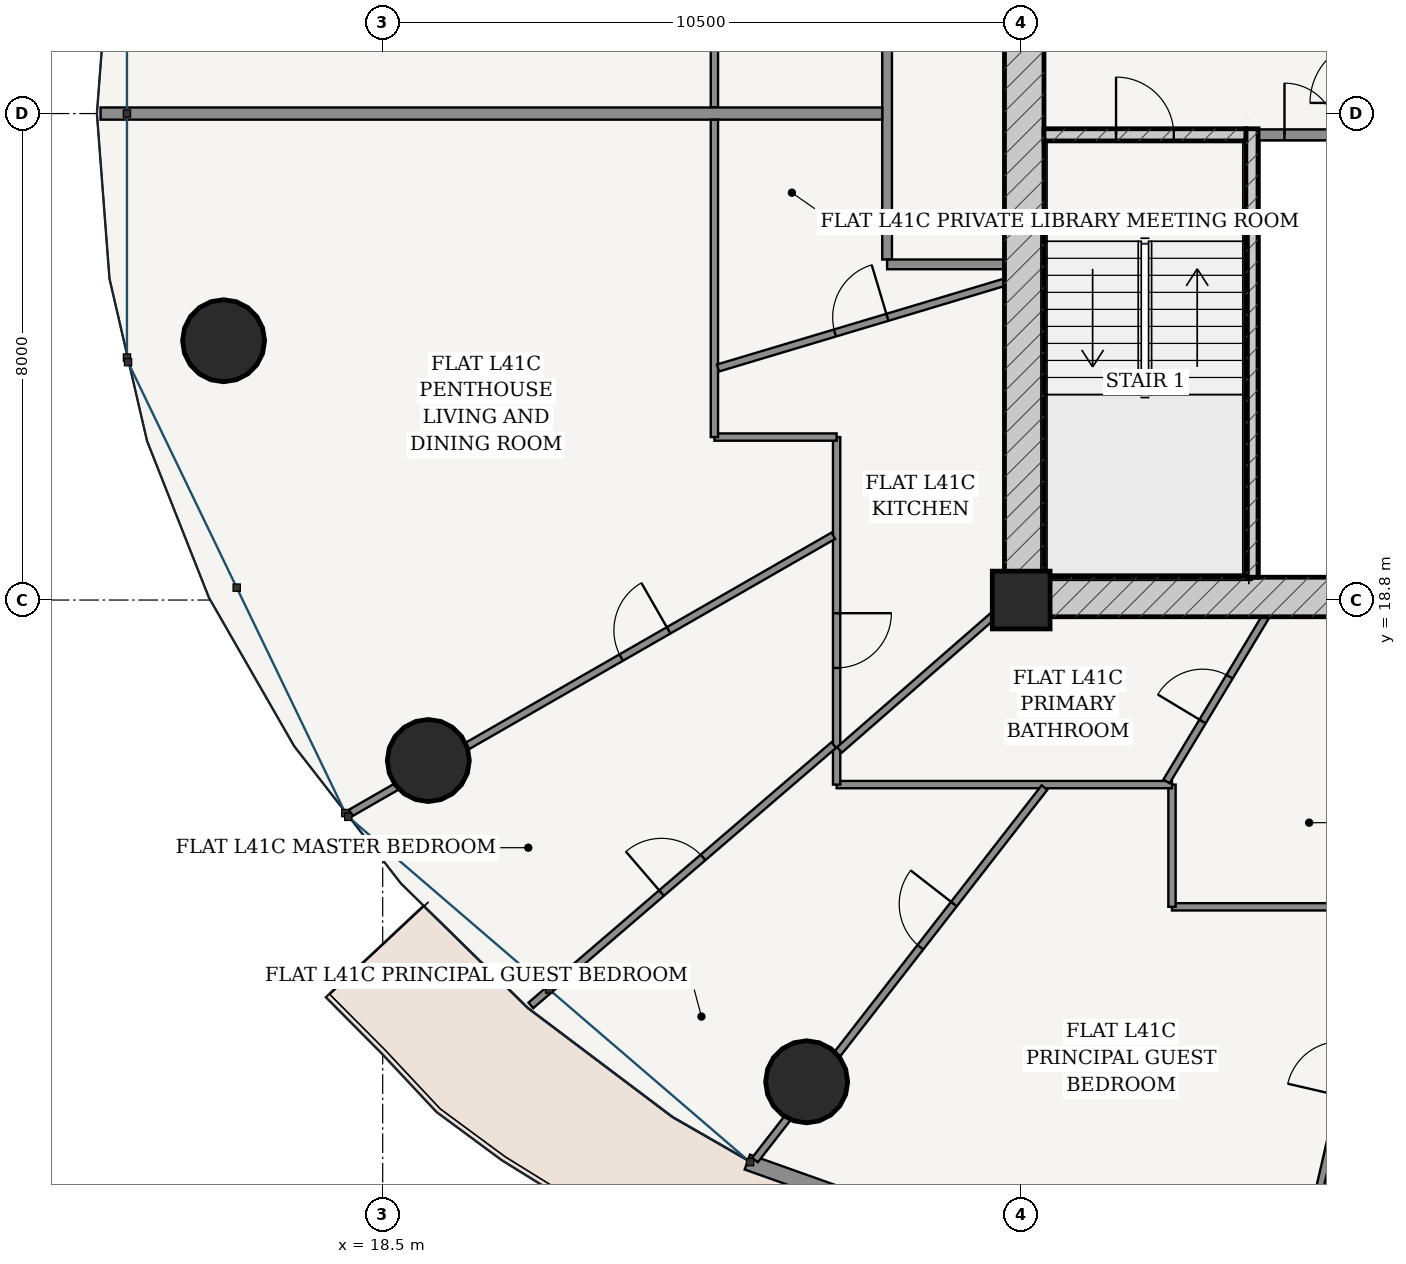
"""IFC4 building model, lengths in metres.
Left out: names, types, materials, properties, quantities, classifications, styles, units other than length and angle.
Written with IfcOpenShell. Run it as: python <this file> out.ifc"""

import sys

from ifc_helpers import new_model, si_unit, direction, frame, frame_2d, origin, origin_2d, place, context, subcontext, project, spatial, rectangle, hollow_circle, extrude, source, transform, mapped, element, fill, save


model = new_model("IFC4")
c1 = context("Model", 3, precision=1e-05, world=origin(), true_north=direction((-0.2419218956, 0.970295726276)))
c2 = subcontext(c1, "Body", "Model", "MODEL_VIEW")
j1 = project(units=[si_unit("LENGTHUNIT", "METRE"), si_unit("PLANEANGLEUNIT", "RADIAN")], contexts=[c1])
p1 = place(None, origin())
s1 = spatial("IfcSite", under=j1, at=p1, CompositionType="ELEMENT")
p2 = place(p1, origin())
s2 = spatial("IfcBuilding", under=s1, at=p2, CompositionType="ELEMENT")
p3 = place(p2, frame((0.0, 0.0, 157.0)))
s3 = spatial("IfcBuildingStorey", under=s2, at=p3, CompositionType="ELEMENT", Elevation=157.0)
p4 = place(p3, frame((29.0, 18.8, 0.0), z_axis=(0.0, 0.0, 1.0), x_axis=(1.0, 0.0, 0.0)))
e1 = element("IfcColumn", 1, at=p4, inside=s3, PredefinedType="COLUMN", context=c2, shape_type="SweptSolid", body=[
    extrude(rectangle(XDim=0.95, YDim=0.95, at=origin_2d()), origin(), (0.0, 0.0, 1.0), 3.6),
])
p5 = place(p3, frame((28.725, 18.85, 0.0), z_axis=(0.0, 0.0, 1.0), x_axis=(1.0, 0.0, 0.0)))
e2 = element("IfcWall", 2, at=p5, inside=s3, PredefinedType="SHEAR", context=c2, shape_type="SweptSolid", body=[
    extrude(rectangle(XDim=18.55, YDim=0.65, at=frame_2d((9.275, 0.0))), origin(), (0.0, 0.0, 1.0), 3.33),
])
p6 = place(p5, frame((8.85, 0.0, 0.0)))
e3 = element("IfcOpeningElement", 3, at=p6, cuts=e2, PredefinedType="OPENING", context=c2, shape_type="SweptSolid", body=[
    extrude(rectangle(XDim=0.85, YDim=2.1, at=frame_2d((0.425, 1.05))), frame((0.0, 0.335, 0.0), z_axis=(0.0, -1.0, 0.0), x_axis=(1.0, 0.0, 0.0)), (0.0, 0.0, 1.0), 0.67),
])
p7 = place(p3, frame((29.05, 19.175, 0.0), z_axis=(0.0, 0.0, 1.0), x_axis=(0.0, 1.0, 0.0)))
e4 = element("IfcWall", 4, at=p7, inside=s3, PredefinedType="SHEAR", context=c2, shape_type="SweptSolid", body=[
    extrude(rectangle(XDim=15.25, YDim=0.65, at=frame_2d((7.625, 0.0))), origin(), (0.0, 0.0, 1.0), 3.33),
])
p8 = place(p7, frame((9.875, 0.0, 0.0)))
e5 = element("IfcOpeningElement", 5, at=p8, cuts=e4, PredefinedType="OPENING", context=c2, shape_type="SweptSolid", body=[
    extrude(rectangle(XDim=1.5, YDim=2.2, at=frame_2d((0.75, 1.1))), frame((0.0, 0.335, 0.0), z_axis=(0.0, -1.0, 0.0), x_axis=(1.0, 0.0, 0.0)), (0.0, 0.0, 1.0), 0.67),
])
p9 = place(p3, frame((32.795, 19.175, 0.0), z_axis=(0.0, 0.0, 1.0), x_axis=(0.0, 1.0, 0.0)))
e6 = element("IfcWall", 6, at=p9, inside=s3, PredefinedType="SOLIDWALL", context=c2, shape_type="SweptSolid", body=[
    extrude(rectangle(XDim=7.375, YDim=0.2, at=frame_2d((3.688, 0.0))), origin(), (0.0, 0.0, 1.0), 3.33),
])
p10 = place(p3, frame((29.375, 26.45, 0.0), z_axis=(0.0, 0.0, 1.0), x_axis=(1.0, 0.0, 0.0)))
e7 = element("IfcWall", 7, at=p10, inside=s3, PredefinedType="SOLIDWALL", context=c2, shape_type="SweptSolid", body=[
    extrude(rectangle(XDim=3.32, YDim=0.2, at=frame_2d((1.66, 0.0))), origin(), (0.0, 0.0, 1.0), 3.33),
])
p11 = place(p10, frame((1.185, 0.0, 0.0)))
e8 = element("IfcOpeningElement", 8, at=p11, cuts=e7, PredefinedType="OPENING", context=c2, shape_type="SweptSolid", body=[
    extrude(rectangle(XDim=0.95, YDim=2.15, at=frame_2d((0.475, 1.075))), frame((0.0, 0.11, 0.0), z_axis=(0.0, -1.0, 0.0), x_axis=(1.0, 0.0, 0.0)), (0.0, 0.0, 1.0), 0.22),
])
for number, where, z_axis, x_axis in (
    (9, (15.883, 23.064, 0.0), (0.0, 0.0, 1.0), (1.0, 0.0, 0.0)),
    (10, (19.25, 16.161, 0.0), (0.0, 0.0, 1.0), (1.0, 0.0, 0.0)),
    (11, (25.472, 10.877, 0.0), (0.0, 0.0, 1.0), (1.0, 0.0, 0.0)),
):
    element("IfcColumn", number, at=place(p3, frame(where, z_axis=z_axis, x_axis=x_axis)), inside=s3, PredefinedType="COLUMN", context=c2, shape_type="SweptSolid", body=[
        extrude(hollow_circle(Radius=0.675, WallThickness=0.042, at=origin_2d()), origin(), (0.0, 0.0, 1.0), 3.6),
    ])
p12 = place(p3, frame((24.497, 9.557, 0.0), z_axis=(0.0, 0.0, 1.0), x_axis=(0.942103604331, -0.335321932934, 0.0)))
e12 = element("IfcWall", 12, at=p12, inside=s3, PredefinedType="SOLIDWALL", context=c2, shape_type="SweptSolid", body=[
    extrude(rectangle(XDim=9.408, YDim=0.26, at=frame_2d((4.704, 0.0))), origin(), (0.0, 0.0, 1.0), 3.33),
])
p13 = place(p12, frame((4.029, 0.0, 0.0)))
e13 = element("IfcOpeningElement", 13, at=p13, cuts=e12, PredefinedType="OPENING", context=c2, shape_type="SweptSolid", body=[
    extrude(rectangle(XDim=1.35, YDim=2.2, at=frame_2d((0.675, 1.1))), frame((0.0, 0.14, 0.0), z_axis=(0.0, -1.0, 0.0), x_axis=(1.0, 0.0, 0.0)), (0.0, 0.0, 1.0), 0.28),
])
p14 = place(p3, frame((32.9, 26.45, 0.0), z_axis=(0.0, 0.0, 1.0), x_axis=(1.0, 0.0, 0.0)))
e14 = element("IfcWall", 14, at=p14, inside=s3, PredefinedType="PARTITIONING", context=c2, shape_type="SweptSolid", body=[
    extrude(rectangle(XDim=1.71, YDim=0.18, at=frame_2d((0.855, 0.0))), origin(), (0.0, 0.0, 1.0), 3.33),
])
p15 = place(p14, frame((0.43, 0.0, 0.0)))
e15 = element("IfcOpeningElement", 15, at=p15, cuts=e14, PredefinedType="OPENING", context=c2, shape_type="SweptSolid", body=[
    extrude(rectangle(XDim=0.85, YDim=2.1, at=frame_2d((0.425, 1.05))), frame((0.0, 0.1, 0.0), z_axis=(0.0, -1.0, 0.0), x_axis=(1.0, 0.0, 0.0)), (0.0, 0.0, 1.0), 0.2),
])
p16 = place(p3, frame((26.795, 24.4, 0.0), z_axis=(0.0, 0.0, 1.0), x_axis=(0.0, 1.0, 0.0)))
e16 = element("IfcWall", 16, at=p16, inside=s3, PredefinedType="PARTITIONING", context=c2, shape_type="SweptSolid", body=[
    extrude(rectangle(XDim=10.675, YDim=0.16, at=frame_2d((5.337, 0.0))), origin(), (0.0, 0.0, 1.0), 2.776),
])
p17 = place(p16, frame((8.422, 0.0, 0.0)))
e17 = element("IfcOpeningElement", 17, at=p17, cuts=e16, PredefinedType="OPENING", context=c2, shape_type="SweptSolid", body=[
    extrude(rectangle(XDim=0.98, YDim=2.2, at=frame_2d((0.49, 1.1))), frame((0.0, 0.09, 0.0), z_axis=(0.0, -1.0, 0.0), x_axis=(1.0, 0.0, 0.0)), (0.0, 0.0, 1.0), 0.18),
])
p18 = place(p3, frame((26.795, 24.32, 0.0), z_axis=(0.0, 0.0, 1.0), x_axis=(1.0, 0.0, 0.0)))
e18 = element("IfcWall", 18, at=p18, inside=s3, PredefinedType="PARTITIONING", context=c2, shape_type="SweptSolid", body=[
    extrude(rectangle(XDim=1.93, YDim=0.16, at=frame_2d((0.965, 0.0))), origin(), (0.0, 0.0, 1.0), 3.33),
])
p19 = place(p3, frame((23.955, 26.902, 0.0), z_axis=(0.0, 0.0, 1.0), x_axis=(0.0, 1.0, 0.0)))
e19 = element("IfcWall", 19, at=p19, inside=s3, PredefinedType="PARTITIONING", context=c2, shape_type="SweptSolid", body=[
    extrude(rectangle(XDim=11.093, YDim=0.12, at=frame_2d((5.546, 0.0))), origin(), (0.0, 0.0, 1.0), 2.776),
])
p20 = place(p19, frame((7.997, 0.0, 0.0)))
e20 = element("IfcOpeningElement", 20, at=p20, cuts=e19, PredefinedType="OPENING", context=c2, shape_type="SweptSolid", body=[
    extrude(rectangle(XDim=0.9, YDim=2.15, at=frame_2d((0.45, 1.075))), frame((0.0, 0.07, 0.0), z_axis=(0.0, -1.0, 0.0), x_axis=(1.0, 0.0, 0.0)), (0.0, 0.0, 1.0), 0.14),
])
p21 = place(p3, frame((26.715, 26.8, 0.0), z_axis=(0.0, 0.0, 1.0), x_axis=(-1.0, 0.0, 0.0)))
e21 = element("IfcWall", 21, at=p21, inside=s3, PredefinedType="PARTITIONING", context=c2, shape_type="SweptSolid", body=[
    extrude(rectangle(XDim=12.855, YDim=0.2, at=frame_2d((6.427, 0.0))), origin(), (0.0, 0.0, 1.0), 2.846),
])
p22 = place(p3, frame((37.898, 13.755, 0.0), z_axis=(0.0, 0.0, 1.0), x_axis=(-1.0, 0.0, 0.0)))
e22 = element("IfcWall", 22, at=p22, inside=s3, PredefinedType="PARTITIONING", context=c2, shape_type="SweptSolid", body=[
    extrude(rectangle(XDim=6.418, YDim=0.12, at=frame_2d((3.209, 0.0))), origin(), (0.0, 0.0, 1.0), 2.776),
])
p23 = place(p22, frame((1.132, 0.0, 0.0)))
e23 = element("IfcOpeningElement", 23, at=p23, cuts=e22, PredefinedType="OPENING", context=c2, shape_type="SweptSolid", body=[
    extrude(rectangle(XDim=0.9, YDim=2.15, at=frame_2d((0.45, 1.075))), frame((0.0, 0.07, 0.0), z_axis=(0.0, -1.0, 0.0), x_axis=(1.0, 0.0, 0.0)), (0.0, 0.0, 1.0), 0.14),
])
p24 = place(p3, frame((31.48, 13.755, 0.0), z_axis=(0.0, 0.0, 1.0), x_axis=(0.0, 1.0, 0.0)))
e24 = element("IfcWall", 24, at=p24, inside=s3, PredefinedType="PARTITIONING", context=c2, shape_type="SweptSolid", body=[
    extrude(rectangle(XDim=2.01, YDim=0.12, at=frame_2d((1.005, 0.0))), origin(), (0.0, 0.0, 1.0), 3.005),
])
p25 = place(p3, frame((31.48, 15.765, 0.0), z_axis=(0.0, 0.0, 1.0), x_axis=(-1.0, 0.0, 0.0)))
e25 = element("IfcWall", 25, at=p25, inside=s3, PredefinedType="PARTITIONING", context=c2, shape_type="SweptSolid", body=[
    extrude(rectangle(XDim=5.515, YDim=0.12, at=frame_2d((2.757, 0.0))), origin(), (0.0, 0.0, 1.0), 2.776),
])
p26 = place(p3, frame((25.965, 15.765, 0.0), z_axis=(0.0, 0.0, 1.0), x_axis=(0.0, 1.0, 0.0)))
e26 = element("IfcWall", 26, at=p26, inside=s3, PredefinedType="PARTITIONING", context=c2, shape_type="SweptSolid", body=[
    extrude(rectangle(XDim=5.715, YDim=0.12, at=frame_2d((2.857, 0.0))), origin(), (0.0, 0.0, 1.0), 2.776),
])
p27 = place(p26, frame((1.919, 0.0, 0.0)))
e27 = element("IfcOpeningElement", 27, at=p27, cuts=e26, PredefinedType="OPENING", context=c2, shape_type="SweptSolid", body=[
    extrude(rectangle(XDim=0.9, YDim=2.15, at=frame_2d((0.45, 1.075))), frame((0.0, 0.07, 0.0), z_axis=(0.0, -1.0, 0.0), x_axis=(1.0, 0.0, 0.0)), (0.0, 0.0, 1.0), 0.14),
])
p28 = place(p3, frame((25.965, 21.48, 0.0), z_axis=(0.0, 0.0, 1.0), x_axis=(-1.0, 0.0, 0.0)))
e28 = element("IfcWall", 28, at=p28, inside=s3, PredefinedType="PARTITIONING", context=c2, shape_type="SweptSolid", body=[
    extrude(rectangle(XDim=2.01, YDim=0.12, at=frame_2d((1.005, 0.0))), origin(), (0.0, 0.0, 1.0), 3.33),
])
p29 = place(p3, frame((23.955, 21.48, 0.0), z_axis=(0.0, 0.0, 1.0), x_axis=(0.0, 1.0, 0.0)))
e29 = element("IfcWall", 29, at=p29, inside=s3, PredefinedType="PARTITIONING", context=c2, shape_type="SweptSolid", body=[
    extrude(rectangle(XDim=5.218, YDim=0.12, at=frame_2d((2.609, 0.0))), origin(), (0.0, 0.0, 1.0), 2.776),
])
p30 = place(p3, frame((25.911, 19.857, 0.0), z_axis=(0.0, 0.0, 1.0), x_axis=(-0.867160939672, -0.498028015986, 0.0)))
e30 = element("IfcWall", 30, at=p30, inside=s3, PredefinedType="PARTITIONING", context=c2, shape_type="SweptSolid", body=[
    extrude(rectangle(XDim=9.152, YDim=0.12, at=frame_2d((4.576, 0.0))), origin(), (0.0, 0.0, 1.0), 2.776),
])
p31 = place(p30, frame((3.124, 0.0, 0.0)))
e31 = element("IfcOpeningElement", 31, at=p31, cuts=e30, PredefinedType="OPENING", context=c2, shape_type="SweptSolid", body=[
    extrude(rectangle(XDim=0.9, YDim=2.15, at=frame_2d((0.45, 1.075))), frame((0.0, 0.07, 0.0), z_axis=(0.0, -1.0, 0.0), x_axis=(1.0, 0.0, 0.0)), (0.0, 0.0, 1.0), 0.14),
])
p32 = place(p3, frame((25.918, 16.416, 0.0), z_axis=(0.0, 0.0, 1.0), x_axis=(-0.758356041353, -0.651840559142, 0.0)))
e32 = element("IfcWall", 32, at=p32, inside=s3, PredefinedType="PARTITIONING", context=c2, shape_type="SweptSolid", body=[
    extrude(rectangle(XDim=6.569, YDim=0.12, at=frame_2d((3.285, 0.0))), origin(), (0.0, 0.0, 1.0), 2.846),
])
p33 = place(p32, frame((2.834, 0.0, 0.0)))
e33 = element("IfcOpeningElement", 33, at=p33, cuts=e32, PredefinedType="OPENING", context=c2, shape_type="SweptSolid", body=[
    extrude(rectangle(XDim=0.9, YDim=2.15, at=frame_2d((0.45, 1.075))), frame((0.0, 0.07, 0.0), z_axis=(0.0, -1.0, 0.0), x_axis=(1.0, 0.0, 0.0)), (0.0, 0.0, 1.0), 0.14),
])
p34 = place(p3, frame((29.383, 15.716, 0.0), z_axis=(0.0, 0.0, 1.0), x_axis=(-0.613751061882, -0.789499609904, 0.0)))
e34 = element("IfcWall", 34, at=p34, inside=s3, PredefinedType="PARTITIONING", context=c2, shape_type="SweptSolid", body=[
    extrude(rectangle(XDim=7.758, YDim=0.12, at=frame_2d((3.879, 0.0))), origin(), (0.0, 0.0, 1.0), 2.776),
])
p35 = place(p34, frame((2.426, 0.0, 0.0)))
e35 = element("IfcOpeningElement", 35, at=p35, cuts=e34, PredefinedType="OPENING", context=c2, shape_type="SweptSolid", body=[
    extrude(rectangle(XDim=0.9, YDim=2.15, at=frame_2d((0.45, 1.075))), frame((0.0, 0.07, 0.0), z_axis=(0.0, -1.0, 0.0), x_axis=(1.0, 0.0, 0.0)), (0.0, 0.0, 1.0), 0.14),
])
p36 = place(p3, frame((34.967, 13.695, 0.0), z_axis=(0.0, 0.0, 1.0), x_axis=(-0.225458405801, -0.974252794327, 0.0)))
e36 = element("IfcWall", 36, at=p36, inside=s3, PredefinedType="PARTITIONING", context=c2, shape_type="SweptSolid", body=[
    extrude(rectangle(XDim=7.383, YDim=0.12, at=frame_2d((3.691, 0.0))), origin(), (0.0, 0.0, 1.0), 2.776),
])
p37 = place(p36, frame((2.232, 0.0, 0.0)))
e37 = element("IfcOpeningElement", 37, at=p37, cuts=e36, PredefinedType="OPENING", context=c2, shape_type="SweptSolid", body=[
    extrude(rectangle(XDim=0.9, YDim=2.15, at=frame_2d((0.45, 1.075))), frame((0.0, 0.07, 0.0), z_axis=(0.0, -1.0, 0.0), x_axis=(1.0, 0.0, 0.0)), (0.0, 0.0, 1.0), 0.14),
])
p38 = place(p3, frame((28.723, 24.025, 0.0), z_axis=(0.0, 0.0, 1.0), x_axis=(-0.958046115523, -0.286614096882, 0.0)))
e38 = element("IfcWall", 38, at=p38, inside=s3, PredefinedType="PARTITIONING", context=c2, shape_type="SweptSolid", body=[
    extrude(rectangle(XDim=4.915, YDim=0.12, at=frame_2d((2.458, 0.0))), origin(), (0.0, 0.0, 1.0), 3.33),
])
p39 = place(p38, frame((2.007, 0.0, 0.0)))
e39 = element("IfcOpeningElement", 39, at=p39, cuts=e38, PredefinedType="OPENING", context=c2, shape_type="SweptSolid", body=[
    extrude(rectangle(XDim=0.9, YDim=2.15, at=frame_2d((0.45, 1.075))), frame((0.0, 0.07, 0.0), z_axis=(0.0, -1.0, 0.0), x_axis=(1.0, 0.0, 0.0)), (0.0, 0.0, 1.0), 0.14),
])
p40 = place(p3, frame((28.588, 18.585, 0.0), z_axis=(0.0, 0.0, 1.0), x_axis=(-0.753380933673, -0.657584343471, 0.0)))
e40 = element("IfcWall", 40, at=p40, inside=s3, PredefinedType="PARTITIONING", context=c2, shape_type="SweptSolid", body=[
    extrude(rectangle(XDim=3.42, YDim=0.12, at=frame_2d((1.71, 0.0))), origin(), (0.0, 0.0, 1.0), 3.005),
])
p41 = place(p3, frame((33.02, 18.525, 0.0), z_axis=(0.0, 0.0, 1.0), x_axis=(-0.515677168, -0.856782970421, 0.0)))
e41 = element("IfcWall", 41, at=p41, inside=s3, PredefinedType="PARTITIONING", context=c2, shape_type="SweptSolid", body=[
    extrude(rectangle(XDim=3.159, YDim=0.12, at=frame_2d((1.58, 0.0))), origin(), (0.0, 0.0, 1.0), 3.33),
])
p42 = place(p41, frame((1.15, 0.0, 0.0)))
e42 = element("IfcOpeningElement", 42, at=p42, cuts=e41, PredefinedType="OPENING", context=c2, shape_type="SweptSolid", body=[
    extrude(rectangle(XDim=0.86, YDim=2.15, at=frame_2d((0.43, 1.075))), frame((0.0, 0.07, 0.0), z_axis=(0.0, -1.0, 0.0), x_axis=(1.0, 0.0, 0.0)), (0.0, 0.0, 1.0), 0.14),
])
m1 = source(origin(), c2, "Body", "SweptSolid", [
    extrude(rectangle(XDim=0.95, YDim=2.15, at=frame_2d((0.475, 1.075))), frame((0.0, 0.025, 0.0), z_axis=(0.0, -1.0, 0.0), x_axis=(1.0, 0.0, 0.0)), (0.0, 0.0, 1.0), 0.05),
])
p43 = place(p11, origin())
e43 = element("IfcDoor", 43, at=p43, inside=s3, OperationType="SINGLE_SWING_LEFT", PredefinedType="DOOR", context=c2, shape_type="MappedRepresentation", body=[
    mapped(m1, transform((0.0, 0.0, 0.0), scale=1.0)),
])
fill(e8, e43)
m2 = source(origin(), c2, "Body", "SweptSolid", [
    extrude(rectangle(XDim=0.85, YDim=2.1, at=frame_2d((0.425, 1.05))), frame((0.0, 0.025, 0.0), z_axis=(0.0, -1.0, 0.0), x_axis=(1.0, 0.0, 0.0)), (0.0, 0.0, 1.0), 0.05),
])
p44 = place(p15, origin())
e44 = element("IfcDoor", 44, at=p44, inside=s3, OperationType="SINGLE_SWING_LEFT", PredefinedType="DOOR", context=c2, shape_type="MappedRepresentation", body=[
    mapped(m2, transform((0.0, 0.0, 0.0), scale=1.0)),
])
fill(e15, e44)
m3 = source(origin(), c2, "Body", "SweptSolid", [
    extrude(rectangle(XDim=0.86, YDim=2.15, at=frame_2d((0.43, 1.075))), frame((0.0, 0.025, 0.0), z_axis=(0.0, -1.0, 0.0), x_axis=(1.0, 0.0, 0.0)), (0.0, 0.0, 1.0), 0.05),
])
p45 = place(p42, frame((0.86, 0.0, 0.0), z_axis=(0.0, 0.0, 1.0), x_axis=(-1.0, 0.0, 0.0)))
e45 = element("IfcDoor", 45, at=p45, inside=s3, OperationType="SINGLE_SWING_LEFT", PredefinedType="DOOR", context=c2, shape_type="MappedRepresentation", body=[
    mapped(m3, transform((0.0, 0.0, 0.0), scale=1.0)),
])
fill(e42, e45)
m4 = source(origin(), c2, "Body", "SweptSolid", [
    extrude(rectangle(XDim=0.9, YDim=2.15, at=frame_2d((0.45, 1.075))), frame((0.0, 0.025, 0.0), z_axis=(0.0, -1.0, 0.0), x_axis=(1.0, 0.0, 0.0)), (0.0, 0.0, 1.0), 0.05),
])
p46 = place(p35, frame((0.9, 0.0, 0.0), z_axis=(0.0, 0.0, 1.0), x_axis=(-1.0, 0.0, 0.0)))
e46 = element("IfcDoor", 46, at=p46, inside=s3, OperationType="SINGLE_SWING_RIGHT", PredefinedType="DOOR", context=c2, shape_type="MappedRepresentation", body=[
    mapped(m4, transform((0.0, 0.0, 0.0), scale=1.0)),
])
fill(e35, e46)
p47 = place(p33, frame((0.9, 0.0, 0.0), z_axis=(0.0, 0.0, 1.0), x_axis=(-1.0, 0.0, 0.0)))
e47 = element("IfcDoor", 47, at=p47, inside=s3, OperationType="SINGLE_SWING_LEFT", PredefinedType="DOOR", context=c2, shape_type="MappedRepresentation", body=[
    mapped(m4, transform((0.0, 0.0, 0.0), scale=1.0)),
])
fill(e33, e47)
p48 = place(p31, frame((0.9, 0.0, 0.0), z_axis=(0.0, 0.0, 1.0), x_axis=(-1.0, 0.0, 0.0)))
e48 = element("IfcDoor", 48, at=p48, inside=s3, OperationType="SINGLE_SWING_RIGHT", PredefinedType="DOOR", context=c2, shape_type="MappedRepresentation", body=[
    mapped(m4, transform((0.0, 0.0, 0.0), scale=1.0)),
])
fill(e31, e48)
p49 = place(p27, frame((0.9, 0.0, 0.0), z_axis=(0.0, 0.0, 1.0), x_axis=(-1.0, 0.0, 0.0)))
e49 = element("IfcDoor", 49, at=p49, inside=s3, OperationType="SINGLE_SWING_LEFT", PredefinedType="DOOR", context=c2, shape_type="MappedRepresentation", body=[
    mapped(m4, transform((0.0, 0.0, 0.0), scale=1.0)),
])
fill(e27, e49)
p50 = place(p39, frame((0.9, 0.0, 0.0), z_axis=(0.0, 0.0, 1.0), x_axis=(-1.0, 0.0, 0.0)))
e50 = element("IfcDoor", 50, at=p50, inside=s3, OperationType="SINGLE_SWING_RIGHT", PredefinedType="DOOR", context=c2, shape_type="MappedRepresentation", body=[
    mapped(m4, transform((0.0, 0.0, 0.0), scale=1.0)),
])
fill(e39, e50)
save(model, sys.argv[1])
